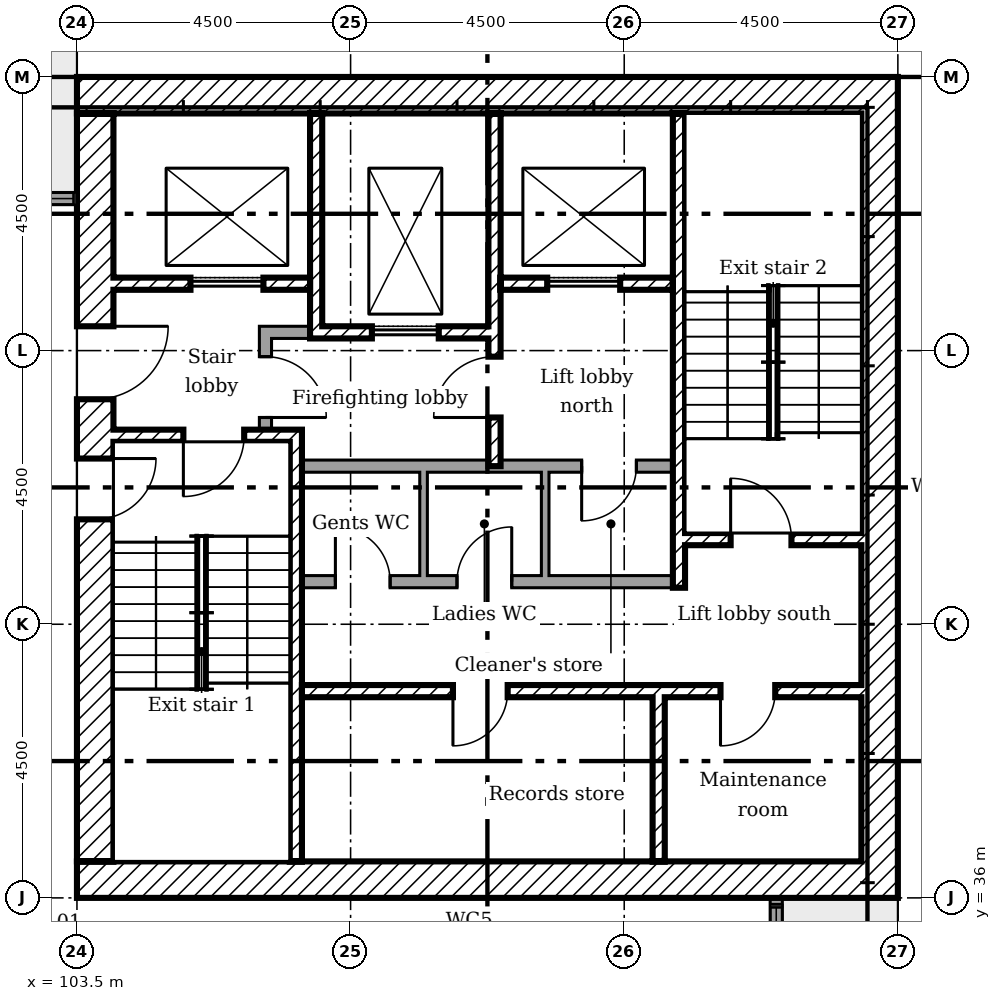
"""IFC4 building model, lengths in metres.
Left out: names, types, materials, properties, quantities, classifications, styles, units other than length and angle.
Written with IfcOpenShell. Run it as: python <this file> out.ifc"""

import sys

from ifc_helpers import new_model, si_unit, direction, frame, frame_2d, origin, place, context, subcontext, project, spatial, rectangle, extrude, element, fill, save


model = new_model("IFC4")
c1 = context("Model", 3, precision=1e-05, world=origin(), true_north=direction((0.0, 1.0)))
c2 = subcontext(c1, "Body", "Model", "MODEL_VIEW")
j1 = project(units=[si_unit("LENGTHUNIT", "METRE"), si_unit("PLANEANGLEUNIT", "RADIAN")], contexts=[c1])
p1 = place(None, origin())
s1 = spatial("IfcSite", under=j1, at=p1, CompositionType="ELEMENT")
p2 = place(p1, origin())
s2 = spatial("IfcBuilding", under=s1, at=p2, CompositionType="ELEMENT")
p3 = place(p2, frame((0.0, 0.0, 190.6)))
s3 = spatial("IfcBuildingStorey", under=s2, at=p3, CompositionType="ELEMENT", Elevation=190.6)
p4 = place(p3, frame((115.0, 33.6, 0.0), z_axis=(0.0, 0.0, 1.0), x_axis=(0.0, 1.0, 0.0)))
e1 = element("IfcWall", 1, at=p4, inside=s3, PredefinedType="ELEMENTEDWALL", context=c2, shape_type="SweptSolid", body=[
    extrude(rectangle(XDim=2.4, YDim=0.2, at=frame_2d((1.2, 0.0))), origin(), (0.0, 0.0, 1.0), 1.8),
])
p5 = place(p3, frame((103.5, 47.5, 0.0), z_axis=(0.0, 0.0, 1.0), x_axis=(-1.0, 0.0, 0.0)))
e2 = element("IfcWall", 2, at=p5, inside=s3, PredefinedType="ELEMENTEDWALL", context=c2, shape_type="SweptSolid", body=[
    extrude(rectangle(XDim=2.1, YDim=0.2, at=frame_2d((1.05, 0.0))), origin(), (0.0, 0.0, 1.0), 1.8),
])
p6 = place(p3, frame((116.7, 36.0, 0.0), z_axis=(0.0, 0.0, 1.0), x_axis=(0.0, 1.0, 0.0)))
e3 = element("IfcWall", 3, at=p6, inside=s3, PredefinedType="SHEAR", context=c2, shape_type="SweptSolid", body=[
    extrude(rectangle(XDim=13.5, YDim=0.6, at=frame_2d((6.75, 0.0))), origin(), (0.0, 0.0, 1.0), 4.75),
])
for number, where in (
    (4, (103.5, 49.2, 0.0)),
    (5, (103.5, 36.3, 0.0)),
):
    element("IfcWall", number, at=place(p3, frame(where)), inside=s3, PredefinedType="SHEAR", context=c2, shape_type="SweptSolid", body=[
        extrude(rectangle(XDim=12.9, YDim=0.6, at=frame_2d((6.45, 0.0))), origin(), (0.0, 0.0, 1.0), 4.75),
    ])
p7 = place(p3, frame((103.8, 36.6, 0.0), z_axis=(0.0, 0.0, 1.0), x_axis=(0.0, 1.0, 0.0)))
e6 = element("IfcWall", 6, at=p7, inside=s3, PredefinedType="SHEAR", context=c2, shape_type="SweptSolid", body=[
    extrude(rectangle(XDim=12.3, YDim=0.6, at=frame_2d((6.15, 0.0))), origin(), (0.0, 0.0, 1.0), 4.75),
])
p8 = place(p7, frame((7.6, 0.0, 0.0)))
e7 = element("IfcOpeningElement", 7, at=p8, cuts=e6, PredefinedType="OPENING", context=c2, shape_type="SweptSolid", body=[
    extrude(rectangle(XDim=1.2, YDim=2.1, at=frame_2d((0.6, 1.05))), frame((0.0, 0.31, 0.0), z_axis=(0.0, -1.0, 0.0), x_axis=(1.0, 0.0, 0.0)), (0.0, 0.0, 1.0), 0.62),
])
p9 = place(p7, frame((5.625, 0.0, 0.0)))
e8 = element("IfcOpeningElement", 8, at=p9, cuts=e6, PredefinedType="OPENING", context=c2, shape_type="SweptSolid", body=[
    extrude(rectangle(XDim=1.0, YDim=2.1, at=frame_2d((0.5, 1.05))), frame((0.0, 0.31, 0.0), z_axis=(0.0, -1.0, 0.0), x_axis=(1.0, 0.0, 0.0)), (0.0, 0.0, 1.0), 0.62),
])
p10 = place(p3, frame((107.433, 48.9, 0.0), z_axis=(0.0, 0.0, 1.0), x_axis=(0.0, -1.0, 0.0)))
e9 = element("IfcWall", 9, at=p10, inside=s3, PredefinedType="SHEAR", context=c2, shape_type="SweptSolid", body=[
    extrude(rectangle(XDim=3.7, YDim=0.2, at=frame_2d((1.85, 0.0))), origin(), (0.0, 0.0, 1.0), 4.75),
])
p11 = place(p3, frame((110.367, 48.9, 0.0), z_axis=(0.0, 0.0, 1.0), x_axis=(0.0, -1.0, 0.0)))
e10 = element("IfcWall", 10, at=p11, inside=s3, PredefinedType="SHEAR", context=c2, shape_type="SweptSolid", body=[
    extrude(rectangle(XDim=5.8, YDim=0.2, at=frame_2d((2.9, 0.0))), origin(), (0.0, 0.0, 1.0), 4.75),
])
p12 = place(p11, frame((4.0, 0.0, 0.0)))
e11 = element("IfcOpeningElement", 11, at=p12, cuts=e10, PredefinedType="OPENING", context=c2, shape_type="SweptSolid", body=[
    extrude(rectangle(XDim=1.0, YDim=2.1, at=frame_2d((0.5, 1.05))), frame((0.0, 0.11, 0.0), z_axis=(0.0, -1.0, 0.0), x_axis=(1.0, 0.0, 0.0)), (0.0, 0.0, 1.0), 0.22),
])
p13 = place(p3, frame((113.067, 36.6, 0.0), z_axis=(0.0, 0.0, 1.0), x_axis=(0.0, 1.0, 0.0)))
e12 = element("IfcWall", 12, at=p13, inside=s3, PredefinedType="SHEAR", context=c2, shape_type="SweptSolid", body=[
    extrude(rectangle(XDim=2.7, YDim=0.2, at=frame_2d((1.35, 0.0))), origin(), (0.0, 0.0, 1.0), 4.75),
])
p14 = place(p3, frame((106.5, 45.3, 0.0)))
e13 = element("IfcWall", 13, at=p14, inside=s3, PredefinedType="PARTITIONING", context=c2, shape_type="SweptSolid", body=[
    extrude(rectangle(XDim=0.833, YDim=0.2, at=frame_2d((0.417, 0.0))), origin(), (0.0, 0.0, 1.0), 4.75),
])
p15 = place(p3, frame((106.6, 43.7, 0.0), z_axis=(0.0, 0.0, 1.0), x_axis=(0.0, 1.0, 0.0)))
e14 = element("IfcWall", 14, at=p15, inside=s3, PredefinedType="PARTITIONING", context=c2, shape_type="SweptSolid", body=[
    extrude(rectangle(XDim=1.5, YDim=0.2, at=frame_2d((0.75, 0.0))), origin(), (0.0, 0.0, 1.0), 4.75),
])
p16 = place(p15, frame((0.2, 0.0, 0.0)))
e15 = element("IfcOpeningElement", 15, at=p16, cuts=e14, PredefinedType="OPENING", context=c2, shape_type="SweptSolid", body=[
    extrude(rectangle(XDim=1.0, YDim=2.1, at=frame_2d((0.5, 1.05))), frame((0.0, 0.11, 0.0), z_axis=(0.0, -1.0, 0.0), x_axis=(1.0, 0.0, 0.0)), (0.0, 0.0, 1.0), 0.22),
])
p17 = place(p3, frame((104.1, 46.1, 0.0)))
e16 = element("IfcWall", 16, at=p17, inside=s3, PredefinedType="SHEAR", context=c2, shape_type="SweptSolid", body=[
    extrude(rectangle(XDim=3.233, YDim=0.2, at=frame_2d((1.617, 0.0))), origin(), (0.0, 0.0, 1.0), 4.75),
])
p18 = place(p17, frame((1.267, 0.0, 0.0)))
e17 = element("IfcOpeningElement", 17, at=p18, cuts=e16, PredefinedType="OPENING", context=c2, shape_type="SweptSolid", body=[
    extrude(rectangle(XDim=1.2, YDim=2.1, at=frame_2d((0.6, 1.05))), frame((0.0, 0.11, 0.0), z_axis=(0.0, -1.0, 0.0), x_axis=(1.0, 0.0, 0.0)), (0.0, 0.0, 1.0), 0.22),
])
p19 = place(p3, frame((110.467, 46.1, 0.0)))
e18 = element("IfcWall", 18, at=p19, inside=s3, PredefinedType="SHEAR", context=c2, shape_type="SweptSolid", body=[
    extrude(rectangle(XDim=2.833, YDim=0.2, at=frame_2d((1.417, 0.0))), origin(), (0.0, 0.0, 1.0), 4.75),
])
p20 = place(p19, frame((0.767, 0.0, 0.0)))
e19 = element("IfcOpeningElement", 19, at=p20, cuts=e18, PredefinedType="OPENING", context=c2, shape_type="SweptSolid", body=[
    extrude(rectangle(XDim=1.2, YDim=2.1, at=frame_2d((0.6, 1.05))), frame((0.0, 0.11, 0.0), z_axis=(0.0, -1.0, 0.0), x_axis=(1.0, 0.0, 0.0)), (0.0, 0.0, 1.0), 0.22),
])
p21 = place(p3, frame((107.533, 45.3, 0.0)))
e20 = element("IfcWall", 20, at=p21, inside=s3, PredefinedType="SHEAR", context=c2, shape_type="SweptSolid", body=[
    extrude(rectangle(XDim=2.733, YDim=0.2, at=frame_2d((1.367, 0.0))), origin(), (0.0, 0.0, 1.0), 4.75),
])
p22 = place(p21, frame((0.817, 0.0, 0.0)))
e21 = element("IfcOpeningElement", 21, at=p22, cuts=e20, PredefinedType="OPENING", context=c2, shape_type="SweptSolid", body=[
    extrude(rectangle(XDim=1.1, YDim=2.1, at=frame_2d((0.55, 1.05))), frame((0.0, 0.11, 0.0), z_axis=(0.0, -1.0, 0.0), x_axis=(1.0, 0.0, 0.0)), (0.0, 0.0, 1.0), 0.22),
])
p23 = place(p3, frame((107.2, 39.4, 0.0)))
e22 = element("IfcWall", 22, at=p23, inside=s3, PredefinedType="SHEAR", context=c2, shape_type="SweptSolid", body=[
    extrude(rectangle(XDim=9.2, YDim=0.2, at=frame_2d((4.6, 0.0))), origin(), (0.0, 0.0, 1.0), 4.75),
])
p24 = place(p23, frame((2.483, 0.0, 0.0)))
e23 = element("IfcOpeningElement", 23, at=p24, cuts=e22, PredefinedType="OPENING", context=c2, shape_type="SweptSolid", body=[
    extrude(rectangle(XDim=0.9, YDim=2.1, at=frame_2d((0.45, 1.05))), frame((0.0, 0.11, 0.0), z_axis=(0.0, -1.0, 0.0), x_axis=(1.0, 0.0, 0.0)), (0.0, 0.0, 1.0), 0.22),
])
p25 = place(p23, frame((6.883, 0.0, 0.0)))
e24 = element("IfcOpeningElement", 24, at=p25, cuts=e22, PredefinedType="OPENING", context=c2, shape_type="SweptSolid", body=[
    extrude(rectangle(XDim=0.9, YDim=2.1, at=frame_2d((0.45, 1.05))), frame((0.0, 0.11, 0.0), z_axis=(0.0, -1.0, 0.0), x_axis=(1.0, 0.0, 0.0)), (0.0, 0.0, 1.0), 0.22),
])
p26 = place(p3, frame((107.1, 36.6, 0.0), z_axis=(0.0, 0.0, 1.0), x_axis=(0.0, 1.0, 0.0)))
e25 = element("IfcWall", 25, at=p26, inside=s3, PredefinedType="SHEAR", context=c2, shape_type="SweptSolid", body=[
    extrude(rectangle(XDim=7.1, YDim=0.2, at=frame_2d((3.55, 0.0))), origin(), (0.0, 0.0, 1.0), 4.75),
])
p27 = place(p3, frame((104.1, 43.6, 0.0)))
e26 = element("IfcWall", 26, at=p27, inside=s3, PredefinedType="SHEAR", context=c2, shape_type="SweptSolid", body=[
    extrude(rectangle(XDim=2.9, YDim=0.2, at=frame_2d((1.45, 0.0))), origin(), (0.0, 0.0, 1.0), 4.75),
])
p28 = place(p27, frame((1.15, 0.0, 0.0)))
e27 = element("IfcOpeningElement", 27, at=p28, cuts=e26, PredefinedType="OPENING", context=c2, shape_type="SweptSolid", body=[
    extrude(rectangle(XDim=1.0, YDim=2.1, at=frame_2d((0.5, 1.05))), frame((0.0, 0.11, 0.0), z_axis=(0.0, -1.0, 0.0), x_axis=(1.0, 0.0, 0.0)), (0.0, 0.0, 1.0), 0.22),
])
p29 = place(p3, frame((113.5, 41.9, 0.0)))
e28 = element("IfcWall", 28, at=p29, inside=s3, PredefinedType="SHEAR", context=c2, shape_type="SweptSolid", body=[
    extrude(rectangle(XDim=2.9, YDim=0.2, at=frame_2d((1.45, 0.0))), origin(), (0.0, 0.0, 1.0), 4.75),
])
p30 = place(p29, frame((0.75, 0.0, 0.0)))
e29 = element("IfcOpeningElement", 29, at=p30, cuts=e28, PredefinedType="OPENING", context=c2, shape_type="SweptSolid", body=[
    extrude(rectangle(XDim=1.0, YDim=2.1, at=frame_2d((0.5, 1.05))), frame((0.0, 0.11, 0.0), z_axis=(0.0, -1.0, 0.0), x_axis=(1.0, 0.0, 0.0)), (0.0, 0.0, 1.0), 0.22),
])
p31 = place(p3, frame((113.4, 41.1, 0.0), z_axis=(0.0, 0.0, 1.0), x_axis=(0.0, 1.0, 0.0)))
e30 = element("IfcWall", 30, at=p31, inside=s3, PredefinedType="SHEAR", context=c2, shape_type="SweptSolid", body=[
    extrude(rectangle(XDim=7.8, YDim=0.2, at=frame_2d((3.9, 0.0))), origin(), (0.0, 0.0, 1.0), 4.75),
])
p32 = place(p3, frame((107.2, 43.1, 0.0)))
e31 = element("IfcWall", 31, at=p32, inside=s3, PredefinedType="PARTITIONING", context=c2, shape_type="SweptSolid", body=[
    extrude(rectangle(XDim=6.1, YDim=0.2, at=frame_2d((3.05, 0.0))), origin(), (0.0, 0.0, 1.0), 4.75),
])
p33 = place(p32, frame((4.6, 0.0, 0.0)))
e32 = element("IfcOpeningElement", 32, at=p33, cuts=e31, PredefinedType="OPENING", context=c2, shape_type="SweptSolid", body=[
    extrude(rectangle(XDim=0.9, YDim=2.1, at=frame_2d((0.45, 1.05))), frame((0.0, 0.11, 0.0), z_axis=(0.0, -1.0, 0.0), x_axis=(1.0, 0.0, 0.0)), (0.0, 0.0, 1.0), 0.22),
])
p34 = place(p3, frame((107.2, 41.2, 0.0)))
e33 = element("IfcWall", 33, at=p34, inside=s3, PredefinedType="PARTITIONING", context=c2, shape_type="SweptSolid", body=[
    extrude(rectangle(XDim=6.1, YDim=0.2, at=frame_2d((3.05, 0.0))), origin(), (0.0, 0.0, 1.0), 4.75),
])
p35 = place(p34, frame((0.55, 0.0, 0.0)))
e34 = element("IfcOpeningElement", 34, at=p35, cuts=e33, PredefinedType="OPENING", context=c2, shape_type="SweptSolid", body=[
    extrude(rectangle(XDim=0.9, YDim=2.1, at=frame_2d((0.45, 1.05))), frame((0.0, 0.11, 0.0), z_axis=(0.0, -1.0, 0.0), x_axis=(1.0, 0.0, 0.0)), (0.0, 0.0, 1.0), 0.22),
])
p36 = place(p34, frame((2.55, 0.0, 0.0)))
e35 = element("IfcOpeningElement", 35, at=p36, cuts=e33, PredefinedType="OPENING", context=c2, shape_type="SweptSolid", body=[
    extrude(rectangle(XDim=0.9, YDim=2.1, at=frame_2d((0.45, 1.05))), frame((0.0, 0.11, 0.0), z_axis=(0.0, -1.0, 0.0), x_axis=(1.0, 0.0, 0.0)), (0.0, 0.0, 1.0), 0.22),
])
for number, where, z_axis, x_axis in (
    (36, (109.2, 41.3, 0.0), (0.0, 0.0, 1.0), (0.0, 1.0, 0.0)),
    (37, (111.2, 41.3, 0.0), (0.0, 0.0, 1.0), (0.0, 1.0, 0.0)),
):
    element("IfcWall", number, at=place(p3, frame(where, z_axis=z_axis, x_axis=x_axis)), inside=s3, PredefinedType="PARTITIONING", context=c2, shape_type="SweptSolid", body=[
        extrude(rectangle(XDim=1.7, YDim=0.125, at=frame_2d((0.85, 0.0))), origin(), (0.0, 0.0, 1.0), 4.75),
    ])
p37 = place(p8, frame((1.2, 0.0, 0.0), x_axis=(-1.0, 0.0, 0.0)))
e38 = element("IfcDoor", 38, at=p37, inside=s3, OperationType="SINGLE_SWING_RIGHT", PredefinedType="DOOR", context=c2, shape_type="SweptSolid", body=[
    extrude(rectangle(XDim=1.2, YDim=2.1, at=frame_2d((0.6, 1.05))), frame((0.0, 0.025, 0.0), z_axis=(0.0, -1.0, 0.0), x_axis=(1.0, 0.0, 0.0)), (0.0, 0.0, 1.0), 0.05),
])
fill(e7, e38)
p38 = place(p28, frame((1.0, 0.0, 0.0), x_axis=(-1.0, 0.0, 0.0)))
e39 = element("IfcDoor", 39, at=p38, inside=s3, OperationType="SINGLE_SWING_LEFT", PredefinedType="DOOR", context=c2, shape_type="SweptSolid", body=[
    extrude(rectangle(XDim=1.0, YDim=2.1, at=frame_2d((0.5, 1.05))), frame((0.0, 0.025, 0.0), z_axis=(0.0, -1.0, 0.0), x_axis=(1.0, 0.0, 0.0)), (0.0, 0.0, 1.0), 0.05),
])
fill(e27, e39)
p39 = place(p9, frame((1.0, 0.0, 0.0), x_axis=(-1.0, 0.0, 0.0)))
e40 = element("IfcDoor", 40, at=p39, inside=s3, OperationType="SINGLE_SWING_RIGHT", PredefinedType="DOOR", context=c2, shape_type="SweptSolid", body=[
    extrude(rectangle(XDim=1.0, YDim=2.1, at=frame_2d((0.5, 1.05))), frame((0.0, 0.025, 0.0), z_axis=(0.0, -1.0, 0.0), x_axis=(1.0, 0.0, 0.0)), (0.0, 0.0, 1.0), 0.05),
])
fill(e8, e40)
p40 = place(p30, origin())
e41 = element("IfcDoor", 41, at=p40, inside=s3, OperationType="SINGLE_SWING_RIGHT", PredefinedType="DOOR", context=c2, shape_type="SweptSolid", body=[
    extrude(rectangle(XDim=1.0, YDim=2.1, at=frame_2d((0.5, 1.05))), frame((0.0, 0.025, 0.0), z_axis=(0.0, -1.0, 0.0), x_axis=(1.0, 0.0, 0.0)), (0.0, 0.0, 1.0), 0.05),
])
fill(e29, e41)
p41 = place(p12, frame((1.0, 0.0, 0.0), x_axis=(-1.0, 0.0, 0.0)))
e42 = element("IfcDoor", 42, at=p41, inside=s3, OperationType="SINGLE_SWING_RIGHT", PredefinedType="DOOR", context=c2, shape_type="SweptSolid", body=[
    extrude(rectangle(XDim=1.0, YDim=2.1, at=frame_2d((0.5, 1.05))), frame((0.0, 0.025, 0.0), z_axis=(0.0, -1.0, 0.0), x_axis=(1.0, 0.0, 0.0)), (0.0, 0.0, 1.0), 0.05),
])
fill(e11, e42)
p42 = place(p16, frame((1.0, 0.0, 0.0), x_axis=(-1.0, 0.0, 0.0)))
e43 = element("IfcDoor", 43, at=p42, inside=s3, OperationType="SINGLE_SWING_LEFT", PredefinedType="DOOR", context=c2, shape_type="SweptSolid", body=[
    extrude(rectangle(XDim=1.0, YDim=2.1, at=frame_2d((0.5, 1.05))), frame((0.0, 0.025, 0.0), z_axis=(0.0, -1.0, 0.0), x_axis=(1.0, 0.0, 0.0)), (0.0, 0.0, 1.0), 0.05),
])
fill(e15, e43)
p43 = place(p24, frame((0.9, 0.0, 0.0), x_axis=(-1.0, 0.0, 0.0)))
e44 = element("IfcDoor", 44, at=p43, inside=s3, OperationType="SINGLE_SWING_LEFT", PredefinedType="DOOR", context=c2, shape_type="SweptSolid", body=[
    extrude(rectangle(XDim=0.9, YDim=2.1, at=frame_2d((0.45, 1.05))), frame((0.0, 0.025, 0.0), z_axis=(0.0, -1.0, 0.0), x_axis=(1.0, 0.0, 0.0)), (0.0, 0.0, 1.0), 0.05),
])
fill(e23, e44)
p44 = place(p25, frame((0.9, 0.0, 0.0), x_axis=(-1.0, 0.0, 0.0)))
e45 = element("IfcDoor", 45, at=p44, inside=s3, OperationType="SINGLE_SWING_LEFT", PredefinedType="DOOR", context=c2, shape_type="SweptSolid", body=[
    extrude(rectangle(XDim=0.9, YDim=2.1, at=frame_2d((0.45, 1.05))), frame((0.0, 0.025, 0.0), z_axis=(0.0, -1.0, 0.0), x_axis=(1.0, 0.0, 0.0)), (0.0, 0.0, 1.0), 0.05),
])
fill(e24, e45)
p45 = place(p35, origin())
e46 = element("IfcDoor", 46, at=p45, inside=s3, OperationType="SINGLE_SWING_RIGHT", PredefinedType="DOOR", context=c2, shape_type="SweptSolid", body=[
    extrude(rectangle(XDim=0.9, YDim=2.1, at=frame_2d((0.45, 1.05))), frame((0.0, 0.025, 0.0), z_axis=(0.0, -1.0, 0.0), x_axis=(1.0, 0.0, 0.0)), (0.0, 0.0, 1.0), 0.05),
])
fill(e34, e46)
p46 = place(p36, origin())
e47 = element("IfcDoor", 47, at=p46, inside=s3, OperationType="SINGLE_SWING_LEFT", PredefinedType="DOOR", context=c2, shape_type="SweptSolid", body=[
    extrude(rectangle(XDim=0.9, YDim=2.1, at=frame_2d((0.45, 1.05))), frame((0.0, 0.025, 0.0), z_axis=(0.0, -1.0, 0.0), x_axis=(1.0, 0.0, 0.0)), (0.0, 0.0, 1.0), 0.05),
])
fill(e35, e47)
p47 = place(p33, frame((0.9, 0.0, 0.0), x_axis=(-1.0, 0.0, 0.0)))
e48 = element("IfcDoor", 48, at=p47, inside=s3, OperationType="SINGLE_SWING_LEFT", PredefinedType="DOOR", context=c2, shape_type="SweptSolid", body=[
    extrude(rectangle(XDim=0.9, YDim=2.1, at=frame_2d((0.45, 1.05))), frame((0.0, 0.025, 0.0), z_axis=(0.0, -1.0, 0.0), x_axis=(1.0, 0.0, 0.0)), (0.0, 0.0, 1.0), 0.05),
])
fill(e32, e48)
p48 = place(p22, origin())
e49 = element("IfcDoor", 49, at=p48, inside=s3, OperationType="SLIDING_TO_LEFT", PredefinedType="DOOR", context=c2, shape_type="SweptSolid", body=[
    extrude(rectangle(XDim=1.1, YDim=2.1, at=frame_2d((0.55, 1.05))), frame((0.0, 0.025, 0.0), z_axis=(0.0, -1.0, 0.0), x_axis=(1.0, 0.0, 0.0)), (0.0, 0.0, 1.0), 0.05),
])
fill(e21, e49)
p49 = place(p18, origin())
e50 = element("IfcDoor", 50, at=p49, inside=s3, OperationType="SLIDING_TO_LEFT", PredefinedType="DOOR", context=c2, shape_type="SweptSolid", body=[
    extrude(rectangle(XDim=1.2, YDim=2.1, at=frame_2d((0.6, 1.05))), frame((0.0, 0.025, 0.0), z_axis=(0.0, -1.0, 0.0), x_axis=(1.0, 0.0, 0.0)), (0.0, 0.0, 1.0), 0.05),
])
fill(e17, e50)
p50 = place(p20, origin())
e51 = element("IfcDoor", 51, at=p50, inside=s3, OperationType="SLIDING_TO_LEFT", PredefinedType="DOOR", context=c2, shape_type="SweptSolid", body=[
    extrude(rectangle(XDim=1.2, YDim=2.1, at=frame_2d((0.6, 1.05))), frame((0.0, 0.025, 0.0), z_axis=(0.0, -1.0, 0.0), x_axis=(1.0, 0.0, 0.0)), (0.0, 0.0, 1.0), 0.05),
])
fill(e19, e51)
save(model, sys.argv[1])
